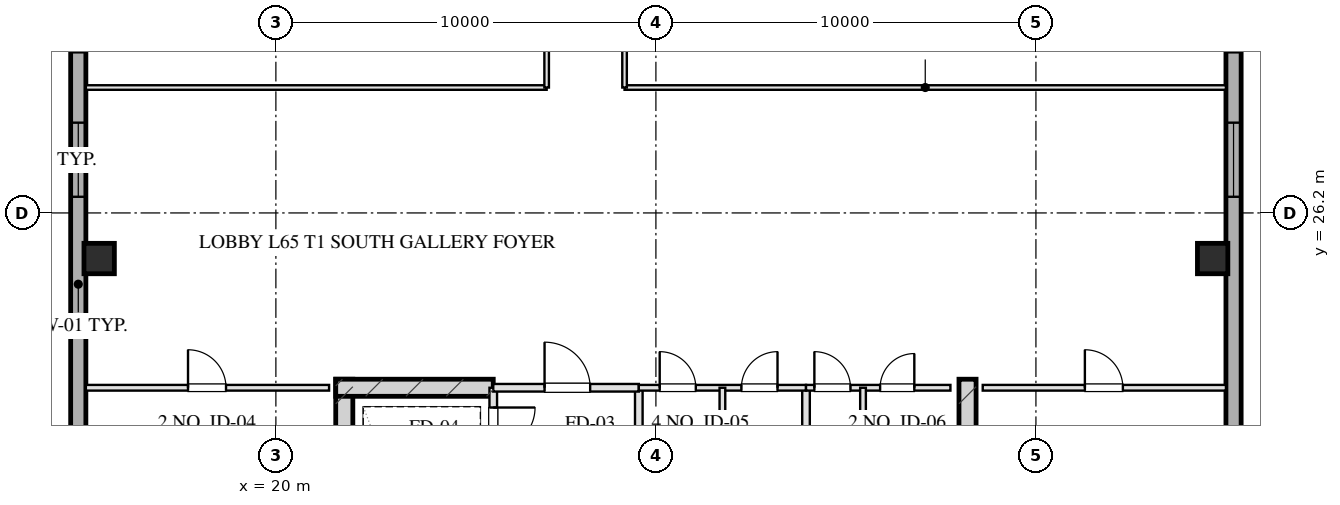
"""IFC4 building model, lengths in metres.
Left out: names, types, materials, properties, quantities, classifications, styles, units other than length and angle.
Written with IfcOpenShell. Run it as: python <this file> out.ifc"""

import sys

from ifc_helpers import new_model, si_unit, direction, frame, frame_2d, origin, origin_2d, place, context, subcontext, project, spatial, rectangle, hollow_rectangle, extrude, element, fill, save


model = new_model("IFC4")
c1 = context("Model", 3, precision=1e-05, world=origin(), true_north=direction((0.0, 1.0)))
c2 = subcontext(c1, "Body", "Model", "MODEL_VIEW")
j1 = project(units=[si_unit("LENGTHUNIT", "METRE"), si_unit("PLANEANGLEUNIT", "RADIAN")], contexts=[c1])
p1 = place(None, origin())
s1 = spatial("IfcSite", under=j1, at=p1, CompositionType="ELEMENT")
p2 = place(p1, origin())
s2 = spatial("IfcBuilding", under=s1, at=p2, CompositionType="ELEMENT")
p3 = place(p2, frame((0.0, 0.0, 240.8)))
s3 = spatial("IfcBuildingStorey", under=s2, at=p3, CompositionType="ELEMENT", Elevation=240.8)
for number, where, z_axis, x_axis in (
    (1, (21.8, 21.825, 0.0), (0.0, 0.0, 1.0), (0.0, -1.0, 0.0)),
    (2, (38.2, 21.825, 0.0), (0.0, 0.0, 1.0), (0.0, -1.0, 0.0)),
):
    element("IfcWall", number, at=place(p3, frame(where, z_axis=z_axis, x_axis=x_axis)), inside=s3, PredefinedType="SHEAR", context=c2, shape_type="SweptSolid", body=[
        extrude(rectangle(XDim=9.33, YDim=0.45, at=frame_2d((4.665, 0.0))), origin(), (0.0, 0.0, 1.0), 3.2),
    ])
p4 = place(p3, frame((21.575, 21.6, 0.0), z_axis=(0.0, 0.0, 1.0), x_axis=(1.0, 0.0, 0.0)))
e3 = element("IfcWall", 3, at=p4, inside=s3, PredefinedType="SHEAR", context=c2, shape_type="SweptSolid", body=[
    extrude(rectangle(XDim=4.145, YDim=0.45, at=frame_2d((2.073, 0.0))), origin(), (0.0, 0.0, 1.0), 3.2),
])
for number, where, z_axis, x_axis in (
    (4, (15.35, 25.0, 0.0), (0.0, 0.0, 1.0), (1.0, 0.0, 0.0)),
    (5, (44.65, 25.0, 0.0), (0.0, 0.0, 1.0), (1.0, 0.0, 0.0)),
):
    element("IfcColumn", number, at=place(p3, frame(where, z_axis=z_axis, x_axis=x_axis)), inside=s3, PredefinedType="COLUMN", context=c2, shape_type="SweptSolid", body=[
        extrude(hollow_rectangle(XDim=0.8, YDim=0.8, WallThickness=0.028, at=origin_2d()), origin(), (0.0, 0.0, 1.0), 3.201),
    ])
p5 = place(p3, frame((14.8, 13.1, 0.0), z_axis=(0.0, 0.0, 1.0), x_axis=(0.0, 1.0, 0.0)))
e6 = element("IfcWall", 6, at=p5, inside=s3, PredefinedType="SOLIDWALL", context=c2, shape_type="SweptSolid", body=[
    extrude(rectangle(XDim=41.8, YDim=0.4, at=frame_2d((20.9, 0.0))), origin(), (0.0, 0.0, 1.0), 2.36),
])
p6 = place(p5, frame((13.525, 0.0, 0.75)))
e7 = element("IfcOpeningElement", 7, at=p6, cuts=e6, PredefinedType="OPENING", context=c2, shape_type="SweptSolid", body=[
    extrude(rectangle(XDim=1.95, YDim=1.21, at=frame_2d((0.975, 0.605))), frame((0.0, 0.21, 0.0), z_axis=(0.0, -1.0, 0.0), x_axis=(1.0, 0.0, 0.0)), (0.0, 0.0, 1.0), 0.42),
])
p7 = place(p5, frame((17.325, 0.0, 0.75)))
e8 = element("IfcOpeningElement", 8, at=p7, cuts=e6, PredefinedType="OPENING", context=c2, shape_type="SweptSolid", body=[
    extrude(rectangle(XDim=1.95, YDim=1.21, at=frame_2d((0.975, 0.605))), frame((0.0, 0.21, 0.0), z_axis=(0.0, -1.0, 0.0), x_axis=(1.0, 0.0, 0.0)), (0.0, 0.0, 1.0), 0.42),
])
p8 = place(p5, frame((23.2, 0.0, 0.0)))
e9 = element("IfcOpeningElement", 9, at=p8, cuts=e6, PredefinedType="OPENING", context=c2, shape_type="SweptSolid", body=[
    extrude(rectangle(XDim=1.1, YDim=2.15, at=frame_2d((0.55, 1.075))), frame((0.0, 0.21, 0.0), z_axis=(0.0, -1.0, 0.0), x_axis=(1.0, 0.0, 0.0)), (0.0, 0.0, 1.0), 0.42),
])
p9 = place(p3, frame((45.2, 54.9, 0.0), z_axis=(0.0, 0.0, 1.0), x_axis=(0.0, -1.0, 0.0)))
e10 = element("IfcWall", 10, at=p9, inside=s3, PredefinedType="SOLIDWALL", context=c2, shape_type="SweptSolid", body=[
    extrude(rectangle(XDim=41.8, YDim=0.4, at=frame_2d((20.9, 0.0))), origin(), (0.0, 0.0, 1.0), 2.36),
])
p10 = place(p9, frame((26.325, 0.0, 0.75)))
e11 = element("IfcOpeningElement", 11, at=p10, cuts=e10, PredefinedType="OPENING", context=c2, shape_type="SweptSolid", body=[
    extrude(rectangle(XDim=1.95, YDim=1.21, at=frame_2d((0.975, 0.605))), frame((0.0, 0.21, 0.0), z_axis=(0.0, -1.0, 0.0), x_axis=(1.0, 0.0, 0.0)), (0.0, 0.0, 1.0), 0.42),
])
p11 = place(p9, frame((22.525, 0.0, 0.75)))
e12 = element("IfcOpeningElement", 12, at=p11, cuts=e10, PredefinedType="OPENING", context=c2, shape_type="SweptSolid", body=[
    extrude(rectangle(XDim=1.95, YDim=1.21, at=frame_2d((0.975, 0.605))), frame((0.0, 0.21, 0.0), z_axis=(0.0, -1.0, 0.0), x_axis=(1.0, 0.0, 0.0)), (0.0, 0.0, 1.0), 0.42),
])
p12 = place(p9, frame((17.5, 0.0, 0.0)))
e13 = element("IfcOpeningElement", 13, at=p12, cuts=e10, PredefinedType="OPENING", context=c2, shape_type="SweptSolid", body=[
    extrude(rectangle(XDim=1.1, YDim=2.15, at=frame_2d((0.55, 1.075))), frame((0.0, 0.21, 0.0), z_axis=(0.0, -1.0, 0.0), x_axis=(1.0, 0.0, 0.0)), (0.0, 0.0, 1.0), 0.42),
])
p13 = place(p3, frame((25.72, 21.6, 0.0), z_axis=(0.0, 0.0, 1.0), x_axis=(0.0, -1.0, 0.0)))
e14 = element("IfcWall", 14, at=p13, inside=s3, PredefinedType="PARTITIONING", context=c2, shape_type="SweptSolid", body=[
    extrude(rectangle(XDim=1.9, YDim=0.2, at=frame_2d((0.95, 0.0))), origin(), (0.0, 0.0, 1.0), 2.925),
])
p14 = place(p13, frame((0.52, 0.0, 0.0)))
e15 = element("IfcOpeningElement", 15, at=p14, cuts=e14, PredefinedType="OPENING", context=c2, shape_type="SweptSolid", body=[
    extrude(rectangle(XDim=1.1, YDim=2.05, at=frame_2d((0.55, 1.025))), frame((0.0, 0.11, 0.0), z_axis=(0.0, -1.0, 0.0), x_axis=(1.0, 0.0, 0.0)), (0.0, 0.0, 1.0), 0.22),
])
p15 = place(p3, frame((29.55, 21.6, 0.0), z_axis=(0.0, 0.0, 1.0), x_axis=(0.0, -1.0, 0.0)))
e16 = element("IfcWall", 16, at=p15, inside=s3, PredefinedType="PARTITIONING", context=c2, shape_type="SweptSolid", body=[
    extrude(rectangle(XDim=8.43, YDim=0.2, at=frame_2d((4.215, 0.0))), origin(), (0.0, 0.0, 1.0), 2.925),
])
p16 = place(p3, frame((25.72, 21.6, 0.0), z_axis=(0.0, 0.0, 1.0), x_axis=(1.0, 0.0, 0.0)))
e17 = element("IfcWall", 17, at=p16, inside=s3, PredefinedType="PARTITIONING", context=c2, shape_type="SweptSolid", body=[
    extrude(rectangle(XDim=3.83, YDim=0.2, at=frame_2d((1.915, 0.0))), origin(), (0.0, 0.0, 1.0), 2.925),
])
p17 = place(p16, frame((1.35, 0.0, 0.0)))
e18 = element("IfcOpeningElement", 18, at=p17, cuts=e17, PredefinedType="OPENING", context=c2, shape_type="SweptSolid", body=[
    extrude(rectangle(XDim=1.2, YDim=2.05, at=frame_2d((0.6, 1.025))), frame((0.0, 0.11, 0.0), z_axis=(0.0, -1.0, 0.0), x_axis=(1.0, 0.0, 0.0)), (0.0, 0.0, 1.0), 0.22),
])
p18 = place(p3, frame((33.95, 21.6, 0.0), z_axis=(0.0, 0.0, 1.0), x_axis=(0.0, -1.0, 0.0)))
e19 = element("IfcWall", 19, at=p18, inside=s3, PredefinedType="PARTITIONING", context=c2, shape_type="SweptSolid", body=[
    extrude(rectangle(XDim=8.43, YDim=0.2, at=frame_2d((4.215, 0.0))), origin(), (0.0, 0.0, 1.0), 2.925),
])
p19 = place(p3, frame((29.55, 21.6, 0.0), z_axis=(0.0, 0.0, 1.0), x_axis=(1.0, 0.0, 0.0)))
e20 = element("IfcWall", 20, at=p19, inside=s3, PredefinedType="PARTITIONING", context=c2, shape_type="SweptSolid", body=[
    extrude(rectangle(XDim=4.4, YDim=0.15, at=frame_2d((2.2, 0.0))), origin(), (0.0, 0.0, 1.0), 2.925),
])
p20 = place(p19, frame((0.55, 0.0, 0.0)))
e21 = element("IfcOpeningElement", 21, at=p20, cuts=e20, PredefinedType="OPENING", context=c2, shape_type="SweptSolid", body=[
    extrude(rectangle(XDim=0.95, YDim=2.05, at=frame_2d((0.475, 1.025))), frame((0.0, 0.085, 0.0), z_axis=(0.0, -1.0, 0.0), x_axis=(1.0, 0.0, 0.0)), (0.0, 0.0, 1.0), 0.17),
])
p21 = place(p19, frame((2.7, 0.0, 0.0)))
e22 = element("IfcOpeningElement", 22, at=p21, cuts=e20, PredefinedType="OPENING", context=c2, shape_type="SweptSolid", body=[
    extrude(rectangle(XDim=0.95, YDim=2.05, at=frame_2d((0.475, 1.025))), frame((0.0, 0.085, 0.0), z_axis=(0.0, -1.0, 0.0), x_axis=(1.0, 0.0, 0.0)), (0.0, 0.0, 1.0), 0.17),
])
p22 = place(p3, frame((31.75, 21.6, 0.0), z_axis=(0.0, 0.0, 1.0), x_axis=(0.0, -1.0, 0.0)))
e23 = element("IfcWall", 23, at=p22, inside=s3, PredefinedType="PARTITIONING", context=c2, shape_type="SweptSolid", body=[
    extrude(rectangle(XDim=8.43, YDim=0.15, at=frame_2d((4.215, 0.0))), origin(), (0.0, 0.0, 1.0), 2.925),
])
p23 = place(p3, frame((33.95, 21.6, 0.0), z_axis=(0.0, 0.0, 1.0), x_axis=(1.0, 0.0, 0.0)))
e24 = element("IfcWall", 24, at=p23, inside=s3, PredefinedType="PARTITIONING", context=c2, shape_type="SweptSolid", body=[
    extrude(rectangle(XDim=3.8, YDim=0.15, at=frame_2d((1.9, 0.0))), origin(), (0.0, 0.0, 1.0), 2.925),
])
p24 = place(p23, frame((0.22, 0.0, 0.0)))
e25 = element("IfcOpeningElement", 25, at=p24, cuts=e24, PredefinedType="OPENING", context=c2, shape_type="SweptSolid", body=[
    extrude(rectangle(XDim=0.95, YDim=2.05, at=frame_2d((0.475, 1.025))), frame((0.0, 0.085, 0.0), z_axis=(0.0, -1.0, 0.0), x_axis=(1.0, 0.0, 0.0)), (0.0, 0.0, 1.0), 0.17),
])
p25 = place(p23, frame((1.95, 0.0, 0.0)))
e26 = element("IfcOpeningElement", 26, at=p25, cuts=e24, PredefinedType="OPENING", context=c2, shape_type="SweptSolid", body=[
    extrude(rectangle(XDim=0.9, YDim=2.05, at=frame_2d((0.45, 1.025))), frame((0.0, 0.085, 0.0), z_axis=(0.0, -1.0, 0.0), x_axis=(1.0, 0.0, 0.0)), (0.0, 0.0, 1.0), 0.17),
])
p26 = place(p3, frame((35.45, 21.6, 0.0), z_axis=(0.0, 0.0, 1.0), x_axis=(0.0, -1.0, 0.0)))
e27 = element("IfcWall", 27, at=p26, inside=s3, PredefinedType="PARTITIONING", context=c2, shape_type="SweptSolid", body=[
    extrude(rectangle(XDim=8.43, YDim=0.15, at=frame_2d((4.215, 0.0))), origin(), (0.0, 0.0, 1.0), 2.565),
])
p27 = place(p26, frame((2.55, 0.0, 0.0)))
e28 = element("IfcOpeningElement", 28, at=p27, cuts=e27, PredefinedType="OPENING", context=c2, shape_type="SweptSolid", body=[
    extrude(rectangle(XDim=0.95, YDim=2.05, at=frame_2d((0.475, 1.025))), frame((0.0, 0.085, 0.0), z_axis=(0.0, -1.0, 0.0), x_axis=(1.0, 0.0, 0.0)), (0.0, 0.0, 1.0), 0.17),
])
p28 = place(p26, frame((5.6, 0.0, 0.0)))
e29 = element("IfcOpeningElement", 29, at=p28, cuts=e27, PredefinedType="OPENING", context=c2, shape_type="SweptSolid", body=[
    extrude(rectangle(XDim=0.9, YDim=2.05, at=frame_2d((0.45, 1.025))), frame((0.0, 0.085, 0.0), z_axis=(0.0, -1.0, 0.0), x_axis=(1.0, 0.0, 0.0)), (0.0, 0.0, 1.0), 0.17),
])
p29 = place(p3, frame((15.0, 21.6, 0.0), z_axis=(0.0, 0.0, 1.0), x_axis=(1.0, 0.0, 0.0)))
e30 = element("IfcWall", 30, at=p29, inside=s3, PredefinedType="PARTITIONING", context=c2, shape_type="SweptSolid", body=[
    extrude(rectangle(XDim=6.4, YDim=0.15, at=frame_2d((3.2, 0.0))), origin(), (0.0, 0.0, 1.0), 2.925),
])
p30 = place(p29, frame((2.688, 0.0, 0.0)))
e31 = element("IfcOpeningElement", 31, at=p30, cuts=e30, PredefinedType="OPENING", context=c2, shape_type="SweptSolid", body=[
    extrude(rectangle(XDim=1.0, YDim=2.05, at=frame_2d((0.5, 1.025))), frame((0.0, 0.085, 0.0), z_axis=(0.0, -1.0, 0.0), x_axis=(1.0, 0.0, 0.0)), (0.0, 0.0, 1.0), 0.17),
])
p31 = place(p3, frame((38.6, 21.6, 0.0), z_axis=(0.0, 0.0, 1.0), x_axis=(1.0, 0.0, 0.0)))
e32 = element("IfcWall", 32, at=p31, inside=s3, PredefinedType="PARTITIONING", context=c2, shape_type="SweptSolid", body=[
    extrude(rectangle(XDim=6.4, YDim=0.15, at=frame_2d((3.2, 0.0))), origin(), (0.0, 0.0, 1.0), 2.925),
])
p32 = place(p31, frame((2.688, 0.0, 0.0)))
e33 = element("IfcOpeningElement", 33, at=p32, cuts=e32, PredefinedType="OPENING", context=c2, shape_type="SweptSolid", body=[
    extrude(rectangle(XDim=1.0, YDim=2.05, at=frame_2d((0.5, 1.025))), frame((0.0, 0.085, 0.0), z_axis=(0.0, -1.0, 0.0), x_axis=(1.0, 0.0, 0.0)), (0.0, 0.0, 1.0), 0.17),
])
p33 = place(p3, frame((15.0, 29.5, 0.0), z_axis=(0.0, 0.0, 1.0), x_axis=(1.0, 0.0, 0.0)))
e34 = element("IfcWall", 34, at=p33, inside=s3, PredefinedType="PARTITIONING", context=c2, shape_type="SweptSolid", body=[
    extrude(rectangle(XDim=12.125, YDim=0.12, at=frame_2d((6.062, 0.0))), origin(), (0.0, 0.0, 1.0), 2.925),
])
p34 = place(p3, frame((29.175, 29.5, 0.0), z_axis=(0.0, 0.0, 1.0), x_axis=(1.0, 0.0, 0.0)))
e35 = element("IfcWall", 35, at=p34, inside=s3, PredefinedType="PARTITIONING", context=c2, shape_type="SweptSolid", body=[
    extrude(rectangle(XDim=15.825, YDim=0.12, at=frame_2d((7.913, 0.0))), origin(), (0.0, 0.0, 1.0), 2.925),
])
p35 = place(p3, frame((27.125, 29.5, 0.0), z_axis=(0.0, 0.0, 1.0), x_axis=(0.0, 1.0, 0.0)))
e36 = element("IfcWall", 36, at=p35, inside=s3, PredefinedType="PARTITIONING", context=c2, shape_type="SweptSolid", body=[
    extrude(rectangle(XDim=9.0, YDim=0.12, at=frame_2d((4.5, 0.0))), origin(), (0.0, 0.0, 1.0), 2.925),
])
p36 = place(p35, frame((2.335, 0.0, 0.0)))
e37 = element("IfcOpeningElement", 37, at=p36, cuts=e36, PredefinedType="OPENING", context=c2, shape_type="SweptSolid", body=[
    extrude(rectangle(XDim=1.0, YDim=2.05, at=frame_2d((0.5, 1.025))), frame((0.0, 0.07, 0.0), z_axis=(0.0, -1.0, 0.0), x_axis=(1.0, 0.0, 0.0)), (0.0, 0.0, 1.0), 0.14),
])
p37 = place(p35, frame((6.835, 0.0, 0.0)))
e38 = element("IfcOpeningElement", 38, at=p37, cuts=e36, PredefinedType="OPENING", context=c2, shape_type="SweptSolid", body=[
    extrude(rectangle(XDim=1.0, YDim=2.05, at=frame_2d((0.5, 1.025))), frame((0.0, 0.07, 0.0), z_axis=(0.0, -1.0, 0.0), x_axis=(1.0, 0.0, 0.0)), (0.0, 0.0, 1.0), 0.14),
])
p38 = place(p3, frame((29.175, 29.5, 0.0), z_axis=(0.0, 0.0, 1.0), x_axis=(0.0, 1.0, 0.0)))
e39 = element("IfcWall", 39, at=p38, inside=s3, PredefinedType="PARTITIONING", context=c2, shape_type="SweptSolid", body=[
    extrude(rectangle(XDim=9.0, YDim=0.12, at=frame_2d((4.5, 0.0))), origin(), (0.0, 0.0, 1.0), 2.925),
])
p39 = place(p38, frame((1.165, 0.0, 0.0)))
e40 = element("IfcOpeningElement", 40, at=p39, cuts=e39, PredefinedType="OPENING", context=c2, shape_type="SweptSolid", body=[
    extrude(rectangle(XDim=1.0, YDim=2.05, at=frame_2d((0.5, 1.025))), frame((0.0, 0.07, 0.0), z_axis=(0.0, -1.0, 0.0), x_axis=(1.0, 0.0, 0.0)), (0.0, 0.0, 1.0), 0.14),
])
p40 = place(p38, frame((4.0, 0.0, 0.0)))
e41 = element("IfcOpeningElement", 41, at=p40, cuts=e39, PredefinedType="OPENING", context=c2, shape_type="SweptSolid", body=[
    extrude(rectangle(XDim=1.0, YDim=2.05, at=frame_2d((0.5, 1.025))), frame((0.0, 0.07, 0.0), z_axis=(0.0, -1.0, 0.0), x_axis=(1.0, 0.0, 0.0)), (0.0, 0.0, 1.0), 0.14),
])
p41 = place(p38, frame((6.835, 0.0, 0.0)))
e42 = element("IfcOpeningElement", 42, at=p41, cuts=e39, PredefinedType="OPENING", context=c2, shape_type="SweptSolid", body=[
    extrude(rectangle(XDim=1.0, YDim=2.05, at=frame_2d((0.5, 1.025))), frame((0.0, 0.07, 0.0), z_axis=(0.0, -1.0, 0.0), x_axis=(1.0, 0.0, 0.0)), (0.0, 0.0, 1.0), 0.14),
])
p42 = place(p6, origin())
e43 = element("IfcWindow", 43, at=p42, inside=s3, PartitioningType="TRIPLE_PANEL_VERTICAL", PredefinedType="WINDOW", context=c2, shape_type="SweptSolid", body=[
    extrude(rectangle(XDim=1.95, YDim=1.21, at=frame_2d((0.975, 0.605))), frame((0.0, 0.03, 0.0), z_axis=(0.0, -1.0, 0.0), x_axis=(1.0, 0.0, 0.0)), (0.0, 0.0, 1.0), 0.06),
])
fill(e7, e43)
p43 = place(p10, origin())
e44 = element("IfcWindow", 44, at=p43, inside=s3, PartitioningType="TRIPLE_PANEL_VERTICAL", PredefinedType="WINDOW", context=c2, shape_type="SweptSolid", body=[
    extrude(rectangle(XDim=1.95, YDim=1.21, at=frame_2d((0.975, 0.605))), frame((0.0, 0.03, 0.0), z_axis=(0.0, -1.0, 0.0), x_axis=(1.0, 0.0, 0.0)), (0.0, 0.0, 1.0), 0.06),
])
fill(e11, e44)
p44 = place(p14, origin())
e45 = element("IfcDoor", 45, at=p44, inside=s3, OperationType="SINGLE_SWING_LEFT", PredefinedType="DOOR", context=c2, shape_type="SweptSolid", body=[
    extrude(rectangle(XDim=1.1, YDim=2.05, at=frame_2d((0.55, 1.025))), frame((0.0, 0.025, 0.0), z_axis=(0.0, -1.0, 0.0), x_axis=(1.0, 0.0, 0.0)), (0.0, 0.0, 1.0), 0.05),
])
fill(e15, e45)
p45 = place(p17, origin())
e46 = element("IfcDoor", 46, at=p45, inside=s3, OperationType="SINGLE_SWING_LEFT", PredefinedType="DOOR", context=c2, shape_type="SweptSolid", body=[
    extrude(rectangle(XDim=1.2, YDim=2.05, at=frame_2d((0.6, 1.025))), frame((0.0, 0.025, 0.0), z_axis=(0.0, -1.0, 0.0), x_axis=(1.0, 0.0, 0.0)), (0.0, 0.0, 1.0), 0.05),
])
fill(e18, e46)
p46 = place(p20, origin())
e47 = element("IfcDoor", 47, at=p46, inside=s3, OperationType="SINGLE_SWING_LEFT", PredefinedType="DOOR", context=c2, shape_type="SweptSolid", body=[
    extrude(rectangle(XDim=0.95, YDim=2.05, at=frame_2d((0.475, 1.025))), frame((0.0, 0.025, 0.0), z_axis=(0.0, -1.0, 0.0), x_axis=(1.0, 0.0, 0.0)), (0.0, 0.0, 1.0), 0.05),
])
fill(e21, e47)
p47 = place(p21, origin())
e48 = element("IfcDoor", 48, at=p47, inside=s3, OperationType="SINGLE_SWING_RIGHT", PredefinedType="DOOR", context=c2, shape_type="SweptSolid", body=[
    extrude(rectangle(XDim=0.95, YDim=2.05, at=frame_2d((0.475, 1.025))), frame((0.0, 0.025, 0.0), z_axis=(0.0, -1.0, 0.0), x_axis=(1.0, 0.0, 0.0)), (0.0, 0.0, 1.0), 0.05),
])
fill(e22, e48)
p48 = place(p24, origin())
e49 = element("IfcDoor", 49, at=p48, inside=s3, OperationType="SINGLE_SWING_LEFT", PredefinedType="DOOR", context=c2, shape_type="SweptSolid", body=[
    extrude(rectangle(XDim=0.95, YDim=2.05, at=frame_2d((0.475, 1.025))), frame((0.0, 0.025, 0.0), z_axis=(0.0, -1.0, 0.0), x_axis=(1.0, 0.0, 0.0)), (0.0, 0.0, 1.0), 0.05),
])
fill(e25, e49)
p49 = place(p25, origin())
e50 = element("IfcDoor", 50, at=p49, inside=s3, OperationType="SINGLE_SWING_RIGHT", PredefinedType="DOOR", context=c2, shape_type="SweptSolid", body=[
    extrude(rectangle(XDim=0.9, YDim=2.05, at=frame_2d((0.45, 1.025))), frame((0.0, 0.025, 0.0), z_axis=(0.0, -1.0, 0.0), x_axis=(1.0, 0.0, 0.0)), (0.0, 0.0, 1.0), 0.05),
])
fill(e26, e50)
p50 = place(p30, origin())
e51 = element("IfcDoor", 51, at=p50, inside=s3, OperationType="SINGLE_SWING_LEFT", PredefinedType="DOOR", context=c2, shape_type="SweptSolid", body=[
    extrude(rectangle(XDim=1.0, YDim=2.05, at=frame_2d((0.5, 1.025))), frame((0.0, 0.025, 0.0), z_axis=(0.0, -1.0, 0.0), x_axis=(1.0, 0.0, 0.0)), (0.0, 0.0, 1.0), 0.05),
])
fill(e31, e51)
p51 = place(p32, origin())
e52 = element("IfcDoor", 52, at=p51, inside=s3, OperationType="SINGLE_SWING_LEFT", PredefinedType="DOOR", context=c2, shape_type="SweptSolid", body=[
    extrude(rectangle(XDim=1.0, YDim=2.05, at=frame_2d((0.5, 1.025))), frame((0.0, 0.025, 0.0), z_axis=(0.0, -1.0, 0.0), x_axis=(1.0, 0.0, 0.0)), (0.0, 0.0, 1.0), 0.05),
])
fill(e33, e52)
save(model, sys.argv[1])
